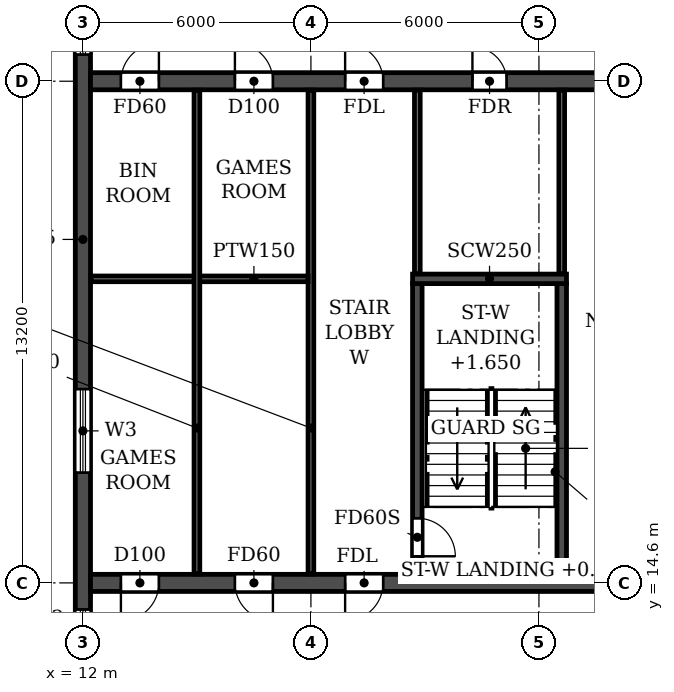
"""IFC4 building model, lengths in metres.
Left out: names, types, materials, properties, quantities, classifications, styles, units other than length and angle.
Written with IfcOpenShell. Run it as: python <this file> out.ifc"""

import sys

from ifc_helpers import new_model, si_unit, direction, frame, frame_2d, origin, place, context, subcontext, project, spatial, rectangle, extrude, element, fill, save


model = new_model("IFC4")
c1 = context("Model", 3, precision=1e-05, world=origin(), true_north=direction((0.0, 1.0)))
c2 = subcontext(c1, "Body", "Model", "MODEL_VIEW")
j1 = project(units=[si_unit("LENGTHUNIT", "METRE"), si_unit("PLANEANGLEUNIT", "RADIAN")], contexts=[c1])
p1 = place(None, origin())
s1 = spatial("IfcSite", under=j1, at=p1, CompositionType="ELEMENT")
p2 = place(p1, origin())
s2 = spatial("IfcBuilding", under=s1, at=p2, CompositionType="ELEMENT")
p3 = place(p2, frame((0.0, 0.0, 122.4)))
s3 = spatial("IfcBuildingStorey", under=s2, at=p3, CompositionType="ELEMENT", Elevation=122.4)
p4 = place(p3, frame((12.0, 4.683, 0.0), z_axis=(0.0, 0.0, 1.0), x_axis=(0.0, 1.0, 0.0)))
e1 = element("IfcWall", 1, at=p4, inside=s3, PredefinedType="SHEAR", context=c2, shape_type="SweptSolid", body=[
    extrude(rectangle(XDim=33.034, YDim=0.4, at=frame_2d((16.517, 0.0))), origin(), (0.0, 0.0, 1.0), 3.07),
])
p5 = place(p4, frame((23.817, 0.0, 0.9)))
e2 = element("IfcOpeningElement", 2, at=p5, cuts=e1, PredefinedType="OPENING", context=c2, shape_type="SweptSolid", body=[
    extrude(rectangle(XDim=1.2, YDim=1.5, at=frame_2d((0.6, 0.75))), frame((0.0, 0.21, 0.0), z_axis=(0.0, -1.0, 0.0), x_axis=(1.0, 0.0, 0.0)), (0.0, 0.0, 1.0), 0.42),
])
p6 = place(p4, frame((8.017, 0.0, 0.9)))
e3 = element("IfcOpeningElement", 3, at=p6, cuts=e1, PredefinedType="OPENING", context=c2, shape_type="SweptSolid", body=[
    extrude(rectangle(XDim=1.2, YDim=1.5, at=frame_2d((0.6, 0.75))), frame((0.0, 0.21, 0.0), z_axis=(0.0, -1.0, 0.0), x_axis=(1.0, 0.0, 0.0)), (0.0, 0.0, 1.0), 0.42),
])
p7 = place(p4, frame((28.293, 0.0, 0.6)))
e4 = element("IfcOpeningElement", 4, at=p7, cuts=e1, PredefinedType="OPENING", context=c2, shape_type="SweptSolid", body=[
    extrude(rectangle(XDim=2.2, YDim=1.8, at=frame_2d((1.1, 0.9))), frame((0.0, 0.21, 0.0), z_axis=(0.0, -1.0, 0.0), x_axis=(1.0, 0.0, 0.0)), (0.0, 0.0, 1.0), 0.42),
])
p8 = place(p4, frame((2.541, 0.0, 0.6)))
e5 = element("IfcOpeningElement", 5, at=p8, cuts=e1, PredefinedType="OPENING", context=c2, shape_type="SweptSolid", body=[
    extrude(rectangle(XDim=2.2, YDim=1.8, at=frame_2d((1.1, 0.9))), frame((0.0, 0.21, 0.0), z_axis=(0.0, -1.0, 0.0), x_axis=(1.0, 0.0, 0.0)), (0.0, 0.0, 1.0), 0.42),
])
p9 = place(p4, frame((12.817, 0.0, 0.6)))
e6 = element("IfcOpeningElement", 6, at=p9, cuts=e1, PredefinedType="OPENING", context=c2, shape_type="SweptSolid", body=[
    extrude(rectangle(XDim=2.2, YDim=1.8, at=frame_2d((1.1, 0.9))), frame((0.0, 0.21, 0.0), z_axis=(0.0, -1.0, 0.0), x_axis=(1.0, 0.0, 0.0)), (0.0, 0.0, 1.0), 0.42),
])
p10 = place(p3, frame((12.2, 14.6, 0.0), z_axis=(0.0, 0.0, 1.0), x_axis=(1.0, 0.0, 0.0)))
e7 = element("IfcWall", 7, at=p10, inside=s3, PredefinedType="SOLIDWALL", context=c2, shape_type="SweptSolid", body=[
    extrude(rectangle(XDim=77.6, YDim=0.45, at=frame_2d((38.8, 0.0))), origin(), (0.0, 0.0, 1.0), 3.07),
])
p11 = place(p10, frame((0.8, 0.0, 0.0)))
e8 = element("IfcOpeningElement", 8, at=p11, cuts=e7, PredefinedType="OPENING", context=c2, shape_type="SweptSolid", body=[
    extrude(rectangle(XDim=1.0, YDim=2.1, at=frame_2d((0.5, 1.05))), frame((0.0, 0.235, 0.0), z_axis=(0.0, -1.0, 0.0), x_axis=(1.0, 0.0, 0.0)), (0.0, 0.0, 1.0), 0.47),
])
p12 = place(p10, frame((3.8, 0.0, 0.0)))
e9 = element("IfcOpeningElement", 9, at=p12, cuts=e7, PredefinedType="OPENING", context=c2, shape_type="SweptSolid", body=[
    extrude(rectangle(XDim=1.0, YDim=2.1, at=frame_2d((0.5, 1.05))), frame((0.0, 0.235, 0.0), z_axis=(0.0, -1.0, 0.0), x_axis=(1.0, 0.0, 0.0)), (0.0, 0.0, 1.0), 0.47),
])
p13 = place(p10, frame((6.7, 0.0, 0.0)))
e10 = element("IfcOpeningElement", 10, at=p13, cuts=e7, PredefinedType="OPENING", context=c2, shape_type="SweptSolid", body=[
    extrude(rectangle(XDim=1.0, YDim=2.1, at=frame_2d((0.5, 1.05))), frame((0.0, 0.235, 0.0), z_axis=(0.0, -1.0, 0.0), x_axis=(1.0, 0.0, 0.0)), (0.0, 0.0, 1.0), 0.47),
])
p14 = place(p10, frame((14.6, 0.0, 0.0)))
e11 = element("IfcOpeningElement", 11, at=p14, cuts=e7, PredefinedType="OPENING", context=c2, shape_type="SweptSolid", body=[
    extrude(rectangle(XDim=1.0, YDim=2.1, at=frame_2d((0.5, 1.05))), frame((0.0, 0.235, 0.0), z_axis=(0.0, -1.0, 0.0), x_axis=(1.0, 0.0, 0.0)), (0.0, 0.0, 1.0), 0.47),
])
p15 = place(p10, frame((19.2, 0.0, 0.0)))
e12 = element("IfcOpeningElement", 12, at=p15, cuts=e7, PredefinedType="OPENING", context=c2, shape_type="SweptSolid", body=[
    extrude(rectangle(XDim=1.0, YDim=2.1, at=frame_2d((0.5, 1.05))), frame((0.0, 0.235, 0.0), z_axis=(0.0, -1.0, 0.0), x_axis=(1.0, 0.0, 0.0)), (0.0, 0.0, 1.0), 0.47),
])
p16 = place(p10, frame((30.5, 0.0, 0.0)))
e13 = element("IfcOpeningElement", 13, at=p16, cuts=e7, PredefinedType="OPENING", context=c2, shape_type="SweptSolid", body=[
    extrude(rectangle(XDim=1.0, YDim=2.1, at=frame_2d((0.5, 1.05))), frame((0.0, 0.235, 0.0), z_axis=(0.0, -1.0, 0.0), x_axis=(1.0, 0.0, 0.0)), (0.0, 0.0, 1.0), 0.47),
])
p17 = place(p10, frame((34.4, 0.0, 0.0)))
e14 = element("IfcOpeningElement", 14, at=p17, cuts=e7, PredefinedType="OPENING", context=c2, shape_type="SweptSolid", body=[
    extrude(rectangle(XDim=1.0, YDim=2.1, at=frame_2d((0.5, 1.05))), frame((0.0, 0.235, 0.0), z_axis=(0.0, -1.0, 0.0), x_axis=(1.0, 0.0, 0.0)), (0.0, 0.0, 1.0), 0.47),
])
p18 = place(p10, frame((38.3, 0.0, 0.0)))
e15 = element("IfcOpeningElement", 15, at=p18, cuts=e7, PredefinedType="OPENING", context=c2, shape_type="SweptSolid", body=[
    extrude(rectangle(XDim=1.0, YDim=2.1, at=frame_2d((0.5, 1.05))), frame((0.0, 0.235, 0.0), z_axis=(0.0, -1.0, 0.0), x_axis=(1.0, 0.0, 0.0)), (0.0, 0.0, 1.0), 0.47),
])
p19 = place(p10, frame((40.9, 0.0, 0.0)))
e16 = element("IfcOpeningElement", 16, at=p19, cuts=e7, PredefinedType="OPENING", context=c2, shape_type="SweptSolid", body=[
    extrude(rectangle(XDim=1.0, YDim=2.1, at=frame_2d((0.5, 1.05))), frame((0.0, 0.235, 0.0), z_axis=(0.0, -1.0, 0.0), x_axis=(1.0, 0.0, 0.0)), (0.0, 0.0, 1.0), 0.47),
])
p20 = place(p10, frame((44.8, 0.0, 0.0)))
e17 = element("IfcOpeningElement", 17, at=p20, cuts=e7, PredefinedType="OPENING", context=c2, shape_type="SweptSolid", body=[
    extrude(rectangle(XDim=1.0, YDim=2.1, at=frame_2d((0.5, 1.05))), frame((0.0, 0.235, 0.0), z_axis=(0.0, -1.0, 0.0), x_axis=(1.0, 0.0, 0.0)), (0.0, 0.0, 1.0), 0.47),
])
p21 = place(p10, frame((57.4, 0.0, 0.0)))
e18 = element("IfcOpeningElement", 18, at=p21, cuts=e7, PredefinedType="OPENING", context=c2, shape_type="SweptSolid", body=[
    extrude(rectangle(XDim=1.0, YDim=2.1, at=frame_2d((0.5, 1.05))), frame((0.0, 0.235, 0.0), z_axis=(0.0, -1.0, 0.0), x_axis=(1.0, 0.0, 0.0)), (0.0, 0.0, 1.0), 0.47),
])
p22 = place(p10, frame((62.0, 0.0, 0.0)))
e19 = element("IfcOpeningElement", 19, at=p22, cuts=e7, PredefinedType="OPENING", context=c2, shape_type="SweptSolid", body=[
    extrude(rectangle(XDim=1.0, YDim=2.1, at=frame_2d((0.5, 1.05))), frame((0.0, 0.235, 0.0), z_axis=(0.0, -1.0, 0.0), x_axis=(1.0, 0.0, 0.0)), (0.0, 0.0, 1.0), 0.47),
])
p23 = place(p10, frame((69.9, 0.0, 0.0)))
e20 = element("IfcOpeningElement", 20, at=p23, cuts=e7, PredefinedType="OPENING", context=c2, shape_type="SweptSolid", body=[
    extrude(rectangle(XDim=1.0, YDim=2.1, at=frame_2d((0.5, 1.05))), frame((0.0, 0.235, 0.0), z_axis=(0.0, -1.0, 0.0), x_axis=(1.0, 0.0, 0.0)), (0.0, 0.0, 1.0), 0.47),
])
p24 = place(p10, frame((72.8, 0.0, 0.0)))
e21 = element("IfcOpeningElement", 21, at=p24, cuts=e7, PredefinedType="OPENING", context=c2, shape_type="SweptSolid", body=[
    extrude(rectangle(XDim=1.0, YDim=2.1, at=frame_2d((0.5, 1.05))), frame((0.0, 0.235, 0.0), z_axis=(0.0, -1.0, 0.0), x_axis=(1.0, 0.0, 0.0)), (0.0, 0.0, 1.0), 0.47),
])
p25 = place(p10, frame((75.8, 0.0, 0.0)))
e22 = element("IfcOpeningElement", 22, at=p25, cuts=e7, PredefinedType="OPENING", context=c2, shape_type="SweptSolid", body=[
    extrude(rectangle(XDim=1.0, YDim=2.1, at=frame_2d((0.5, 1.05))), frame((0.0, 0.235, 0.0), z_axis=(0.0, -1.0, 0.0), x_axis=(1.0, 0.0, 0.0)), (0.0, 0.0, 1.0), 0.47),
])
p26 = place(p3, frame((12.2, 27.8, 0.0), z_axis=(0.0, 0.0, 1.0), x_axis=(1.0, 0.0, 0.0)))
e23 = element("IfcWall", 23, at=p26, inside=s3, PredefinedType="SOLIDWALL", context=c2, shape_type="SweptSolid", body=[
    extrude(rectangle(XDim=77.6, YDim=0.45, at=frame_2d((38.8, 0.0))), origin(), (0.0, 0.0, 1.0), 3.07),
])
p27 = place(p26, frame((0.8, 0.0, 0.0)))
e24 = element("IfcOpeningElement", 24, at=p27, cuts=e23, PredefinedType="OPENING", context=c2, shape_type="SweptSolid", body=[
    extrude(rectangle(XDim=1.0, YDim=2.1, at=frame_2d((0.5, 1.05))), frame((0.0, 0.235, 0.0), z_axis=(0.0, -1.0, 0.0), x_axis=(1.0, 0.0, 0.0)), (0.0, 0.0, 1.0), 0.47),
])
p28 = place(p26, frame((3.8, 0.0, 0.0)))
e25 = element("IfcOpeningElement", 25, at=p28, cuts=e23, PredefinedType="OPENING", context=c2, shape_type="SweptSolid", body=[
    extrude(rectangle(XDim=1.0, YDim=2.1, at=frame_2d((0.5, 1.05))), frame((0.0, 0.235, 0.0), z_axis=(0.0, -1.0, 0.0), x_axis=(1.0, 0.0, 0.0)), (0.0, 0.0, 1.0), 0.47),
])
p29 = place(p26, frame((6.7, 0.0, 0.0)))
e26 = element("IfcOpeningElement", 26, at=p29, cuts=e23, PredefinedType="OPENING", context=c2, shape_type="SweptSolid", body=[
    extrude(rectangle(XDim=1.0, YDim=2.1, at=frame_2d((0.5, 1.05))), frame((0.0, 0.235, 0.0), z_axis=(0.0, -1.0, 0.0), x_axis=(1.0, 0.0, 0.0)), (0.0, 0.0, 1.0), 0.47),
])
p30 = place(p26, frame((10.05, 0.0, 0.0)))
e27 = element("IfcOpeningElement", 27, at=p30, cuts=e23, PredefinedType="OPENING", context=c2, shape_type="SweptSolid", body=[
    extrude(rectangle(XDim=0.9, YDim=2.1, at=frame_2d((0.45, 1.05))), frame((0.0, 0.235, 0.0), z_axis=(0.0, -1.0, 0.0), x_axis=(1.0, 0.0, 0.0)), (0.0, 0.0, 1.0), 0.47),
])
p31 = place(p26, frame((19.25, 0.0, 0.0)))
e28 = element("IfcOpeningElement", 28, at=p31, cuts=e23, PredefinedType="OPENING", context=c2, shape_type="SweptSolid", body=[
    extrude(rectangle(XDim=0.9, YDim=2.1, at=frame_2d((0.45, 1.05))), frame((0.0, 0.235, 0.0), z_axis=(0.0, -1.0, 0.0), x_axis=(1.0, 0.0, 0.0)), (0.0, 0.0, 1.0), 0.47),
])
p32 = place(p26, frame((25.0, 0.0, 0.0)))
e29 = element("IfcOpeningElement", 29, at=p32, cuts=e23, PredefinedType="OPENING", context=c2, shape_type="SweptSolid", body=[
    extrude(rectangle(XDim=1.0, YDim=2.1, at=frame_2d((0.5, 1.05))), frame((0.0, 0.235, 0.0), z_axis=(0.0, -1.0, 0.0), x_axis=(1.0, 0.0, 0.0)), (0.0, 0.0, 1.0), 0.47),
])
p33 = place(p26, frame((30.2, 0.0, 0.0)))
e30 = element("IfcOpeningElement", 30, at=p33, cuts=e23, PredefinedType="OPENING", context=c2, shape_type="SweptSolid", body=[
    extrude(rectangle(XDim=1.0, YDim=2.1, at=frame_2d((0.5, 1.05))), frame((0.0, 0.235, 0.0), z_axis=(0.0, -1.0, 0.0), x_axis=(1.0, 0.0, 0.0)), (0.0, 0.0, 1.0), 0.47),
])
p34 = place(p26, frame((35.4, 0.0, 0.0)))
e31 = element("IfcOpeningElement", 31, at=p34, cuts=e23, PredefinedType="OPENING", context=c2, shape_type="SweptSolid", body=[
    extrude(rectangle(XDim=1.0, YDim=2.1, at=frame_2d((0.5, 1.05))), frame((0.0, 0.235, 0.0), z_axis=(0.0, -1.0, 0.0), x_axis=(1.0, 0.0, 0.0)), (0.0, 0.0, 1.0), 0.47),
])
p35 = place(p26, frame((38.3, 0.0, 0.0)))
e32 = element("IfcOpeningElement", 32, at=p35, cuts=e23, PredefinedType="OPENING", context=c2, shape_type="SweptSolid", body=[
    extrude(rectangle(XDim=1.0, YDim=2.1, at=frame_2d((0.5, 1.05))), frame((0.0, 0.235, 0.0), z_axis=(0.0, -1.0, 0.0), x_axis=(1.0, 0.0, 0.0)), (0.0, 0.0, 1.0), 0.47),
])
p36 = place(p26, frame((41.2, 0.0, 0.0)))
e33 = element("IfcOpeningElement", 33, at=p36, cuts=e23, PredefinedType="OPENING", context=c2, shape_type="SweptSolid", body=[
    extrude(rectangle(XDim=1.0, YDim=2.1, at=frame_2d((0.5, 1.05))), frame((0.0, 0.235, 0.0), z_axis=(0.0, -1.0, 0.0), x_axis=(1.0, 0.0, 0.0)), (0.0, 0.0, 1.0), 0.47),
])
p37 = place(p26, frame((46.4, 0.0, 0.0)))
e34 = element("IfcOpeningElement", 34, at=p37, cuts=e23, PredefinedType="OPENING", context=c2, shape_type="SweptSolid", body=[
    extrude(rectangle(XDim=1.0, YDim=2.1, at=frame_2d((0.5, 1.05))), frame((0.0, 0.235, 0.0), z_axis=(0.0, -1.0, 0.0), x_axis=(1.0, 0.0, 0.0)), (0.0, 0.0, 1.0), 0.47),
])
p38 = place(p26, frame((51.6, 0.0, 0.0)))
e35 = element("IfcOpeningElement", 35, at=p38, cuts=e23, PredefinedType="OPENING", context=c2, shape_type="SweptSolid", body=[
    extrude(rectangle(XDim=1.0, YDim=2.1, at=frame_2d((0.5, 1.05))), frame((0.0, 0.235, 0.0), z_axis=(0.0, -1.0, 0.0), x_axis=(1.0, 0.0, 0.0)), (0.0, 0.0, 1.0), 0.47),
])
p39 = place(p26, frame((54.2, 0.0, 0.0)))
e36 = element("IfcOpeningElement", 36, at=p39, cuts=e23, PredefinedType="OPENING", context=c2, shape_type="SweptSolid", body=[
    extrude(rectangle(XDim=1.0, YDim=2.1, at=frame_2d((0.5, 1.05))), frame((0.0, 0.235, 0.0), z_axis=(0.0, -1.0, 0.0), x_axis=(1.0, 0.0, 0.0)), (0.0, 0.0, 1.0), 0.47),
])
p40 = place(p26, frame((57.45, 0.0, 0.0)))
e37 = element("IfcOpeningElement", 37, at=p40, cuts=e23, PredefinedType="OPENING", context=c2, shape_type="SweptSolid", body=[
    extrude(rectangle(XDim=0.9, YDim=2.1, at=frame_2d((0.45, 1.05))), frame((0.0, 0.235, 0.0), z_axis=(0.0, -1.0, 0.0), x_axis=(1.0, 0.0, 0.0)), (0.0, 0.0, 1.0), 0.47),
])
p41 = place(p26, frame((66.65, 0.0, 0.0)))
e38 = element("IfcOpeningElement", 38, at=p41, cuts=e23, PredefinedType="OPENING", context=c2, shape_type="SweptSolid", body=[
    extrude(rectangle(XDim=0.9, YDim=2.1, at=frame_2d((0.45, 1.05))), frame((0.0, 0.235, 0.0), z_axis=(0.0, -1.0, 0.0), x_axis=(1.0, 0.0, 0.0)), (0.0, 0.0, 1.0), 0.47),
])
p42 = place(p26, frame((69.9, 0.0, 0.0)))
e39 = element("IfcOpeningElement", 39, at=p42, cuts=e23, PredefinedType="OPENING", context=c2, shape_type="SweptSolid", body=[
    extrude(rectangle(XDim=1.0, YDim=2.1, at=frame_2d((0.5, 1.05))), frame((0.0, 0.235, 0.0), z_axis=(0.0, -1.0, 0.0), x_axis=(1.0, 0.0, 0.0)), (0.0, 0.0, 1.0), 0.47),
])
p43 = place(p26, frame((72.8, 0.0, 0.0)))
e40 = element("IfcOpeningElement", 40, at=p43, cuts=e23, PredefinedType="OPENING", context=c2, shape_type="SweptSolid", body=[
    extrude(rectangle(XDim=1.0, YDim=2.1, at=frame_2d((0.5, 1.05))), frame((0.0, 0.235, 0.0), z_axis=(0.0, -1.0, 0.0), x_axis=(1.0, 0.0, 0.0)), (0.0, 0.0, 1.0), 0.47),
])
p44 = place(p26, frame((75.8, 0.0, 0.0)))
e41 = element("IfcOpeningElement", 41, at=p44, cuts=e23, PredefinedType="OPENING", context=c2, shape_type="SweptSolid", body=[
    extrude(rectangle(XDim=1.0, YDim=2.1, at=frame_2d((0.5, 1.05))), frame((0.0, 0.235, 0.0), z_axis=(0.0, -1.0, 0.0), x_axis=(1.0, 0.0, 0.0)), (0.0, 0.0, 1.0), 0.47),
])
p45 = place(p3, frame((20.8, 14.825, 0.0), z_axis=(0.0, 0.0, 1.0), x_axis=(0.0, 1.0, 0.0)))
e42 = element("IfcWall", 42, at=p45, inside=s3, PredefinedType="SOLIDWALL", context=c2, shape_type="SweptSolid", body=[
    extrude(rectangle(XDim=7.65, YDim=0.25, at=frame_2d((3.825, 0.0))), origin(), (0.0, 0.0, 1.0), 3.07),
])
p46 = place(p45, frame((0.475, 0.0, 0.0)))
e43 = element("IfcOpeningElement", 43, at=p46, cuts=e42, PredefinedType="OPENING", context=c2, shape_type="SweptSolid", body=[
    extrude(rectangle(XDim=1.0, YDim=2.1, at=frame_2d((0.5, 1.05))), frame((0.0, 0.135, 0.0), z_axis=(0.0, -1.0, 0.0), x_axis=(1.0, 0.0, 0.0)), (0.0, 0.0, 1.0), 0.27),
])
p47 = place(p3, frame((24.6, 14.825, 0.0), z_axis=(0.0, 0.0, 1.0), x_axis=(0.0, 1.0, 0.0)))
e44 = element("IfcWall", 44, at=p47, inside=s3, PredefinedType="SOLIDWALL", context=c2, shape_type="SweptSolid", body=[
    extrude(rectangle(XDim=7.65, YDim=0.25, at=frame_2d((3.825, 0.0))), origin(), (0.0, 0.0, 1.0), 3.07),
])
p48 = place(p3, frame((20.675, 22.6, 0.0), z_axis=(0.0, 0.0, 1.0), x_axis=(1.0, 0.0, 0.0)))
e45 = element("IfcWall", 45, at=p48, inside=s3, PredefinedType="SOLIDWALL", context=c2, shape_type="SweptSolid", body=[
    extrude(rectangle(XDim=4.05, YDim=0.25, at=frame_2d((2.025, 0.0))), origin(), (0.0, 0.0, 1.0), 3.07),
])
p49 = place(p3, frame((18.0, 14.835, 0.0), z_axis=(0.0, 0.0, 1.0), x_axis=(0.0, 1.0, 0.0)))
e46 = element("IfcWall", 46, at=p49, inside=s3, PredefinedType="PARTITIONING", context=c2, shape_type="SweptSolid", body=[
    extrude(rectangle(XDim=12.73, YDim=0.15, at=frame_2d((6.365, 0.0))), origin(), (0.0, 0.0, 1.0), 3.07),
])
p50 = place(p3, frame((12.21, 22.6, 0.0), z_axis=(0.0, 0.0, 1.0), x_axis=(1.0, 0.0, 0.0)))
e47 = element("IfcWall", 47, at=p50, inside=s3, PredefinedType="PARTITIONING", context=c2, shape_type="SweptSolid", body=[
    extrude(rectangle(XDim=5.715, YDim=0.15, at=frame_2d((2.857, 0.0))), origin(), (0.0, 0.0, 1.0), 3.07),
])
p51 = place(p3, frame((15.0, 14.835, 0.0), z_axis=(0.0, 0.0, 1.0), x_axis=(0.0, 1.0, 0.0)))
e48 = element("IfcWall", 48, at=p51, inside=s3, PredefinedType="PARTITIONING", context=c2, shape_type="SweptSolid", body=[
    extrude(rectangle(XDim=12.73, YDim=0.15, at=frame_2d((6.365, 0.0))), origin(), (0.0, 0.0, 1.0), 3.07),
])
for number, where, z_axis, x_axis in (
    (49, (20.8, 22.735, 0.0), (0.0, 0.0, 1.0), (0.0, 1.0, 0.0)),
    (50, (24.6, 22.735, 0.0), (0.0, 0.0, 1.0), (0.0, 1.0, 0.0)),
):
    element("IfcWall", number, at=place(p3, frame(where, z_axis=z_axis, x_axis=x_axis)), inside=s3, PredefinedType="PARTITIONING", context=c2, shape_type="SweptSolid", body=[
        extrude(rectangle(XDim=4.83, YDim=0.15, at=frame_2d((2.415, 0.0))), origin(), (0.0, 0.0, 1.0), 3.07),
    ])
p52 = place(p5, origin())
e51 = element("IfcWindow", 51, at=p52, inside=s3, PartitioningType="SINGLE_PANEL", PredefinedType="WINDOW", context=c2, shape_type="SweptSolid", body=[
    extrude(rectangle(XDim=1.2, YDim=1.5, at=frame_2d((0.6, 0.75))), frame((0.0, 0.03, 0.0), z_axis=(0.0, -1.0, 0.0), x_axis=(1.0, 0.0, 0.0)), (0.0, 0.0, 1.0), 0.06),
])
fill(e2, e51)
p53 = place(p6, origin())
e52 = element("IfcWindow", 52, at=p53, inside=s3, PartitioningType="SINGLE_PANEL", PredefinedType="WINDOW", context=c2, shape_type="SweptSolid", body=[
    extrude(rectangle(XDim=1.2, YDim=1.5, at=frame_2d((0.6, 0.75))), frame((0.0, 0.03, 0.0), z_axis=(0.0, -1.0, 0.0), x_axis=(1.0, 0.0, 0.0)), (0.0, 0.0, 1.0), 0.06),
])
fill(e3, e52)
p54 = place(p9, origin())
e53 = element("IfcWindow", 53, at=p54, inside=s3, PartitioningType="DOUBLE_PANEL_HORIZONTAL", PredefinedType="WINDOW", context=c2, shape_type="SweptSolid", body=[
    extrude(rectangle(XDim=2.2, YDim=1.8, at=frame_2d((1.1, 0.9))), frame((0.0, 0.03, 0.0), z_axis=(0.0, -1.0, 0.0), x_axis=(1.0, 0.0, 0.0)), (0.0, 0.0, 1.0), 0.06),
])
fill(e6, e53)
p55 = place(p27, origin())
e54 = element("IfcDoor", 54, at=p55, inside=s3, OperationType="SINGLE_SWING_RIGHT", PredefinedType="DOOR", context=c2, shape_type="SweptSolid", body=[
    extrude(rectangle(XDim=1.0, YDim=2.1, at=frame_2d((0.5, 1.05))), frame((0.0, 0.025, 0.0), z_axis=(0.0, -1.0, 0.0), x_axis=(1.0, 0.0, 0.0)), (0.0, 0.0, 1.0), 0.05),
])
fill(e24, e54)
p56 = place(p28, origin())
e55 = element("IfcDoor", 55, at=p56, inside=s3, OperationType="SINGLE_SWING_LEFT", PredefinedType="DOOR", context=c2, shape_type="SweptSolid", body=[
    extrude(rectangle(XDim=1.0, YDim=2.1, at=frame_2d((0.5, 1.05))), frame((0.0, 0.025, 0.0), z_axis=(0.0, -1.0, 0.0), x_axis=(1.0, 0.0, 0.0)), (0.0, 0.0, 1.0), 0.05),
])
fill(e25, e55)
p57 = place(p29, origin())
e56 = element("IfcDoor", 56, at=p57, inside=s3, OperationType="SINGLE_SWING_LEFT", PredefinedType="DOOR", context=c2, shape_type="SweptSolid", body=[
    extrude(rectangle(XDim=1.0, YDim=2.1, at=frame_2d((0.5, 1.05))), frame((0.0, 0.025, 0.0), z_axis=(0.0, -1.0, 0.0), x_axis=(1.0, 0.0, 0.0)), (0.0, 0.0, 1.0), 0.05),
])
fill(e26, e56)
p58 = place(p30, origin())
e57 = element("IfcDoor", 57, at=p58, inside=s3, OperationType="SINGLE_SWING_LEFT", PredefinedType="DOOR", context=c2, shape_type="SweptSolid", body=[
    extrude(rectangle(XDim=0.9, YDim=2.1, at=frame_2d((0.45, 1.05))), frame((0.0, 0.025, 0.0), z_axis=(0.0, -1.0, 0.0), x_axis=(1.0, 0.0, 0.0)), (0.0, 0.0, 1.0), 0.05),
])
fill(e27, e57)
p59 = place(p11, frame((1.0, 0.0, 0.0), z_axis=(0.0, 0.0, 1.0), x_axis=(-1.0, 0.0, 0.0)))
e58 = element("IfcDoor", 58, at=p59, inside=s3, OperationType="SINGLE_SWING_RIGHT", PredefinedType="DOOR", context=c2, shape_type="SweptSolid", body=[
    extrude(rectangle(XDim=1.0, YDim=2.1, at=frame_2d((0.5, 1.05))), frame((0.0, 0.025, 0.0), z_axis=(0.0, -1.0, 0.0), x_axis=(1.0, 0.0, 0.0)), (0.0, 0.0, 1.0), 0.05),
])
fill(e8, e58)
p60 = place(p12, frame((1.0, 0.0, 0.0), z_axis=(0.0, 0.0, 1.0), x_axis=(-1.0, 0.0, 0.0)))
e59 = element("IfcDoor", 59, at=p60, inside=s3, OperationType="SINGLE_SWING_LEFT", PredefinedType="DOOR", context=c2, shape_type="SweptSolid", body=[
    extrude(rectangle(XDim=1.0, YDim=2.1, at=frame_2d((0.5, 1.05))), frame((0.0, 0.025, 0.0), z_axis=(0.0, -1.0, 0.0), x_axis=(1.0, 0.0, 0.0)), (0.0, 0.0, 1.0), 0.05),
])
fill(e9, e59)
p61 = place(p13, frame((1.0, 0.0, 0.0), z_axis=(0.0, 0.0, 1.0), x_axis=(-1.0, 0.0, 0.0)))
e60 = element("IfcDoor", 60, at=p61, inside=s3, OperationType="SINGLE_SWING_RIGHT", PredefinedType="DOOR", context=c2, shape_type="SweptSolid", body=[
    extrude(rectangle(XDim=1.0, YDim=2.1, at=frame_2d((0.5, 1.05))), frame((0.0, 0.025, 0.0), z_axis=(0.0, -1.0, 0.0), x_axis=(1.0, 0.0, 0.0)), (0.0, 0.0, 1.0), 0.05),
])
fill(e10, e60)
p62 = place(p46, frame((1.0, 0.0, 0.0), z_axis=(0.0, 0.0, 1.0), x_axis=(-1.0, 0.0, 0.0)))
e61 = element("IfcDoor", 61, at=p62, inside=s3, OperationType="SINGLE_SWING_RIGHT", PredefinedType="DOOR", context=c2, shape_type="SweptSolid", body=[
    extrude(rectangle(XDim=1.0, YDim=2.1, at=frame_2d((0.5, 1.05))), frame((0.0, 0.025, 0.0), z_axis=(0.0, -1.0, 0.0), x_axis=(1.0, 0.0, 0.0)), (0.0, 0.0, 1.0), 0.05),
])
fill(e43, e61)
save(model, sys.argv[1])
